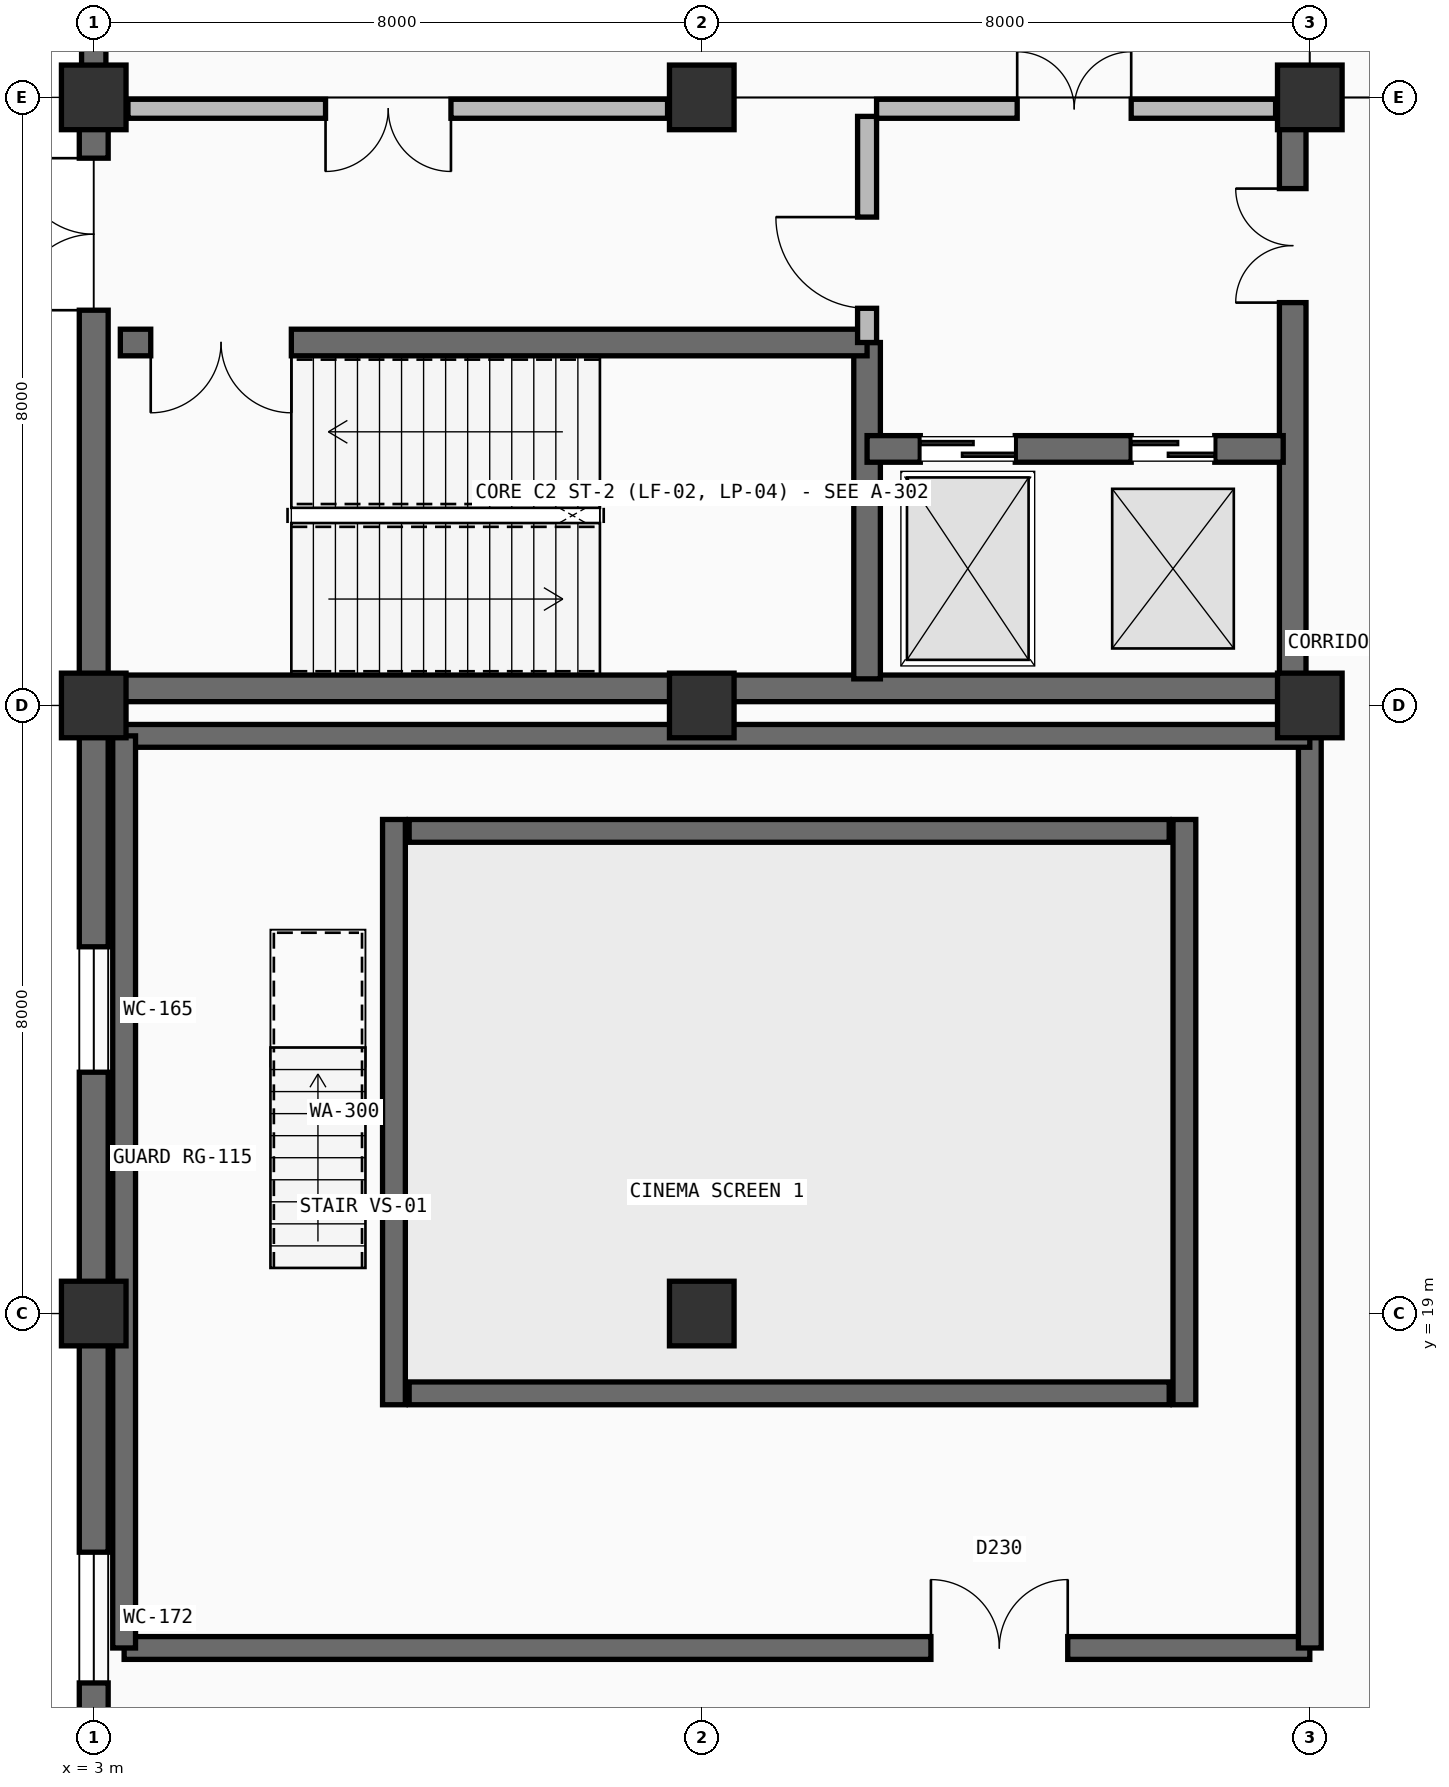
"""IFC4 building model, lengths in metres.
Left out: names, types, materials, properties, quantities, classifications, styles, units other than length and angle.
Written with IfcOpenShell. Run it as: python <this file> out.ifc"""

import sys

from ifc_helpers import new_model, si_unit, direction, frame, frame_2d, origin, origin_2d, place, context, subcontext, project, spatial, polyline, rectangle, outline, extrude, element, fill, save


model = new_model("IFC4")
c1 = context("Model", 3, precision=1e-05, world=origin(), true_north=direction((0.0, 1.0)))
c2 = subcontext(c1, "Body", "Model", "MODEL_VIEW")
j1 = project(units=[si_unit("LENGTHUNIT", "METRE"), si_unit("PLANEANGLEUNIT", "RADIAN")], contexts=[c1])
p1 = place(None, origin())
s1 = spatial("IfcSite", under=j1, at=p1, CompositionType="ELEMENT")
p2 = place(p1, origin())
s2 = spatial("IfcBuilding", under=s1, at=p2, CompositionType="ELEMENT")
p3 = place(p2, origin())
s3 = spatial("IfcBuildingStorey", under=s2, at=p3, CompositionType="ELEMENT", Elevation=0.0)
for number, where, z_axis, x_axis in (
    (1, (3.0, 19.0, 0.0), (0.0, 0.0, 1.0), (1.0, 0.0, 0.0)),
    (2, (3.0, 27.0, 0.0), (0.0, 0.0, 1.0), (1.0, 0.0, 0.0)),
    (3, (3.0, 35.0, 0.0), (0.0, 0.0, 1.0), (1.0, 0.0, 0.0)),
    (4, (11.0, 19.0, 0.0), (0.0, 0.0, 1.0), (1.0, 0.0, 0.0)),
    (5, (11.0, 27.0, 0.0), (0.0, 0.0, 1.0), (1.0, 0.0, 0.0)),
    (6, (11.0, 35.0, 0.0), (0.0, 0.0, 1.0), (1.0, 0.0, 0.0)),
    (7, (19.0, 27.0, 0.0), (0.0, 0.0, 1.0), (1.0, 0.0, 0.0)),
    (8, (19.0, 35.0, 0.0), (0.0, 0.0, 1.0), (1.0, 0.0, 0.0)),
):
    element("IfcColumn", number, at=place(p3, frame(where, z_axis=z_axis, x_axis=x_axis)), inside=s3, PredefinedType="COLUMN", context=c2, shape_type="SweptSolid", body=[
        extrude(rectangle(XDim=0.85, YDim=0.85, at=origin_2d()), origin(), (0.0, 0.0, 1.0), 5.4),
    ])
for number, where, z_axis, x_axis in (
    (9, (6.95, 17.8, 0.0), (0.0, 0.0, 1.0), (0.0, 1.0, 0.0)),
    (10, (17.35, 17.8, 0.0), (0.0, 0.0, 1.0), (0.0, 1.0, 0.0)),
):
    element("IfcWall", number, at=place(p3, frame(where, z_axis=z_axis, x_axis=x_axis)), inside=s3, PredefinedType="SHEAR", context=c2, shape_type="SweptSolid", body=[
        extrude(outline(polyline([(0.0, 0.0), (7.7, 0.0), (7.7, 2.07), (0.0, 0.32), (0.0, 0.0)])), frame((0.0, 0.15, 0.0), z_axis=(0.0, -1.0, 0.0), x_axis=(1.0, 0.0, 0.0)), (0.0, 0.0, 1.0), 0.3),
    ])
p4 = place(p3, frame((7.15, 25.35, 0.0), z_axis=(0.0, 0.0, 1.0), x_axis=(1.0, 0.0, 0.0)))
e11 = element("IfcWall", 11, at=p4, inside=s3, PredefinedType="SHEAR", context=c2, shape_type="SweptSolid", body=[
    extrude(rectangle(XDim=10.0, YDim=0.3, at=frame_2d((5.0, 0.0))), origin(), (0.0, 0.0, 1.0), 2.07),
])
p5 = place(p3, frame((7.15, 17.95, 0.0), z_axis=(0.0, 0.0, 1.0), x_axis=(1.0, 0.0, 0.0)))
e12 = element("IfcWall", 12, at=p5, inside=s3, PredefinedType="SHEAR", context=c2, shape_type="SweptSolid", body=[
    extrude(rectangle(XDim=10.0, YDim=0.3, at=frame_2d((5.0, 0.0))), origin(), (0.0, 0.0, 1.0), 0.32),
])
p6 = place(p3, frame((3.0, 11.0, 0.0), z_axis=(0.0, 0.0, 1.0), x_axis=(0.0, 1.0, 0.0)))
e13 = element("IfcWall", 13, at=p6, inside=s3, PredefinedType="SOLIDWALL", context=c2, shape_type="SweptSolid", body=[
    extrude(rectangle(XDim=8.0, YDim=0.38, at=frame_2d((4.0, 0.0))), origin(), (0.0, 0.0, 1.0), 5.4),
])
p7 = place(p6, frame((3.14, 0.0, 0.85)))
e14 = element("IfcOpeningElement", 14, at=p7, cuts=e13, PredefinedType="OPENING", context=c2, shape_type="SweptSolid", body=[
    extrude(rectangle(XDim=1.72, YDim=3.1, at=frame_2d((0.86, 1.55))), frame((0.0, 0.2, 0.0), z_axis=(0.0, -1.0, 0.0), x_axis=(1.0, 0.0, 0.0)), (0.0, 0.0, 1.0), 0.4),
])
p8 = place(p3, frame((3.0, 19.0, 0.0), z_axis=(0.0, 0.0, 1.0), x_axis=(0.0, 1.0, 0.0)))
e15 = element("IfcWall", 15, at=p8, inside=s3, PredefinedType="SOLIDWALL", context=c2, shape_type="SweptSolid", body=[
    extrude(rectangle(XDim=8.0, YDim=0.38, at=frame_2d((4.0, 0.0))), origin(), (0.0, 0.0, 1.0), 5.4),
])
p9 = place(p8, frame((3.175, 0.0, 0.85)))
e16 = element("IfcOpeningElement", 16, at=p9, cuts=e15, PredefinedType="OPENING", context=c2, shape_type="SweptSolid", body=[
    extrude(rectangle(XDim=1.65, YDim=3.0, at=frame_2d((0.825, 1.5))), frame((0.0, 0.2, 0.0), z_axis=(0.0, -1.0, 0.0), x_axis=(1.0, 0.0, 0.0)), (0.0, 0.0, 1.0), 0.4),
])
p10 = place(p3, frame((3.0, 27.0, 0.0), z_axis=(0.0, 0.0, 1.0), x_axis=(0.0, 1.0, 0.0)))
e17 = element("IfcWall", 17, at=p10, inside=s3, PredefinedType="SOLIDWALL", context=c2, shape_type="SweptSolid", body=[
    extrude(rectangle(XDim=8.0, YDim=0.38, at=frame_2d((4.0, 0.0))), origin(), (0.0, 0.0, 1.0), 5.4),
])
p11 = place(p10, frame((5.2, 0.0, 0.0)))
e18 = element("IfcOpeningElement", 18, at=p11, cuts=e17, PredefinedType="OPENING", context=c2, shape_type="SweptSolid", body=[
    extrude(rectangle(XDim=2.0, YDim=2.6, at=frame_2d((1.0, 1.3))), frame((0.0, 0.2, 0.0), z_axis=(0.0, -1.0, 0.0), x_axis=(1.0, 0.0, 0.0)), (0.0, 0.0, 1.0), 0.4),
])
p12 = place(p3, frame((3.0, 35.0, 0.0), z_axis=(0.0, 0.0, 1.0), x_axis=(0.0, 1.0, 0.0)))
e19 = element("IfcWall", 19, at=p12, inside=s3, PredefinedType="SOLIDWALL", context=c2, shape_type="SweptSolid", body=[
    extrude(rectangle(XDim=8.0, YDim=0.32, at=frame_2d((4.0, 0.0))), origin(), (0.0, 0.0, 1.0), 5.4),
])
p13 = place(p12, frame((3.1, 0.0, 1.1)))
e20 = element("IfcOpeningElement", 20, at=p13, cuts=e19, PredefinedType="OPENING", context=c2, shape_type="SweptSolid", body=[
    extrude(rectangle(XDim=1.8, YDim=0.85, at=frame_2d((0.9, 0.425))), frame((0.0, 0.17, 0.0), z_axis=(0.0, -1.0, 0.0), x_axis=(1.0, 0.0, 0.0)), (0.0, 0.0, 1.0), 0.34),
])
p14 = place(p3, frame((3.2, 27.225, 0.0), z_axis=(0.0, 0.0, 1.0), x_axis=(1.0, 0.0, 0.0)))
e21 = element("IfcWall", 21, at=p14, inside=s3, PredefinedType="SHEAR", context=c2, shape_type="SweptSolid", body=[
    extrude(rectangle(XDim=15.6, YDim=0.35, at=frame_2d((7.8, 0.0))), origin(), (0.0, 0.0, 1.0), 5.1),
])
p15 = place(p3, frame((13.175, 27.35, 0.0), z_axis=(0.0, 0.0, 1.0), x_axis=(0.0, 1.0, 0.0)))
e22 = element("IfcWall", 22, at=p15, inside=s3, PredefinedType="SHEAR", context=c2, shape_type="SweptSolid", body=[
    extrude(rectangle(XDim=4.425, YDim=0.35, at=frame_2d((2.212, 0.0))), origin(), (0.0, 0.0, 1.0), 5.1),
])
p16 = place(p3, frame((18.775, 27.2, 0.0), z_axis=(0.0, 0.0, 1.0), x_axis=(0.0, 1.0, 0.0)))
e23 = element("IfcWall", 23, at=p16, inside=s3, PredefinedType="SHEAR", context=c2, shape_type="SweptSolid", body=[
    extrude(rectangle(XDim=7.6, YDim=0.35, at=frame_2d((3.8, 0.0))), origin(), (0.0, 0.0, 1.0), 5.1),
])
p17 = place(p16, frame((5.1, 0.0, 0.0)))
e24 = element("IfcOpeningElement", 24, at=p17, cuts=e23, PredefinedType="OPENING", context=c2, shape_type="SweptSolid", body=[
    extrude(rectangle(XDim=1.5, YDim=2.2, at=frame_2d((0.75, 1.1))), frame((0.0, 0.185, 0.0), z_axis=(0.0, -1.0, 0.0), x_axis=(1.0, 0.0, 0.0)), (0.0, 0.0, 1.0), 0.37),
])
p18 = place(p3, frame((3.35, 31.775, 0.0), z_axis=(0.0, 0.0, 1.0), x_axis=(1.0, 0.0, 0.0)))
e25 = element("IfcWall", 25, at=p18, inside=s3, PredefinedType="SHEAR", context=c2, shape_type="SweptSolid", body=[
    extrude(rectangle(XDim=9.825, YDim=0.35, at=frame_2d((4.913, 0.0))), origin(), (0.0, 0.0, 1.0), 5.1),
])
p19 = place(p18, frame((0.4, 0.0, 0.0)))
e26 = element("IfcOpeningElement", 26, at=p19, cuts=e25, PredefinedType="OPENING", context=c2, shape_type="SweptSolid", body=[
    extrude(rectangle(XDim=1.85, YDim=2.25, at=frame_2d((0.925, 1.125))), frame((0.0, 0.185, 0.0), z_axis=(0.0, -1.0, 0.0), x_axis=(1.0, 0.0, 0.0)), (0.0, 0.0, 1.0), 0.37),
])
p20 = place(p3, frame((13.175, 30.375, 0.0), z_axis=(0.0, 0.0, 1.0), x_axis=(1.0, 0.0, 0.0)))
e27 = element("IfcWall", 27, at=p20, inside=s3, PredefinedType="SHEAR", context=c2, shape_type="SweptSolid", body=[
    extrude(rectangle(XDim=5.475, YDim=0.35, at=frame_2d((2.737, 0.0))), origin(), (0.0, 0.0, 1.0), 5.1),
])
p21 = place(p20, frame((0.7, 0.0, 0.0)))
e28 = element("IfcOpeningElement", 28, at=p21, cuts=e27, PredefinedType="OPENING", context=c2, shape_type="SweptSolid", body=[
    extrude(rectangle(XDim=1.25, YDim=2.25, at=frame_2d((0.625, 1.125))), frame((0.0, 0.185, 0.0), z_axis=(0.0, -1.0, 0.0), x_axis=(1.0, 0.0, 0.0)), (0.0, 0.0, 1.0), 0.37),
])
p22 = place(p20, frame((3.475, 0.0, 0.0)))
e29 = element("IfcOpeningElement", 29, at=p22, cuts=e27, PredefinedType="OPENING", context=c2, shape_type="SweptSolid", body=[
    extrude(rectangle(XDim=1.1, YDim=2.2, at=frame_2d((0.55, 1.1))), frame((0.0, 0.185, 0.0), z_axis=(0.0, -1.0, 0.0), x_axis=(1.0, 0.0, 0.0)), (0.0, 0.0, 1.0), 0.37),
])
p23 = place(p3, frame((13.175, 31.775, 0.0), z_axis=(0.0, 0.0, 1.0), x_axis=(0.0, 1.0, 0.0)))
e30 = element("IfcWall", 30, at=p23, inside=s3, PredefinedType="PARTITIONING", context=c2, shape_type="SweptSolid", body=[
    extrude(rectangle(XDim=2.975, YDim=0.25, at=frame_2d((1.488, 0.0))), origin(), (0.0, 0.0, 1.0), 5.1),
])
p24 = place(p23, frame((0.45, 0.0, 0.0)))
e31 = element("IfcOpeningElement", 31, at=p24, cuts=e30, PredefinedType="OPENING", context=c2, shape_type="SweptSolid", body=[
    extrude(rectangle(XDim=1.2, YDim=2.2, at=frame_2d((0.6, 1.1))), frame((0.0, 0.135, 0.0), z_axis=(0.0, -1.0, 0.0), x_axis=(1.0, 0.0, 0.0)), (0.0, 0.0, 1.0), 0.27),
])
p25 = place(p3, frame((3.45, 34.85, 0.0), z_axis=(0.0, 0.0, 1.0), x_axis=(1.0, 0.0, 0.0)))
e32 = element("IfcWall", 32, at=p25, inside=s3, PredefinedType="PARTITIONING", context=c2, shape_type="SweptSolid", body=[
    extrude(rectangle(XDim=7.1, YDim=0.25, at=frame_2d((3.55, 0.0))), origin(), (0.0, 0.0, 1.0), 4.335),
])
p26 = place(p25, frame((2.6, 0.0, 0.0)))
e33 = element("IfcOpeningElement", 33, at=p26, cuts=e32, PredefinedType="OPENING", context=c2, shape_type="SweptSolid", body=[
    extrude(rectangle(XDim=1.65, YDim=2.25, at=frame_2d((0.825, 1.125))), frame((0.0, 0.135, 0.0), z_axis=(0.0, -1.0, 0.0), x_axis=(1.0, 0.0, 0.0)), (0.0, 0.0, 1.0), 0.27),
])
p27 = place(p3, frame((13.3, 34.85, 0.0), z_axis=(0.0, 0.0, 1.0), x_axis=(1.0, 0.0, 0.0)))
e34 = element("IfcWall", 34, at=p27, inside=s3, PredefinedType="PARTITIONING", context=c2, shape_type="SweptSolid", body=[
    extrude(rectangle(XDim=5.25, YDim=0.25, at=frame_2d((2.625, 0.0))), origin(), (0.0, 0.0, 1.0), 4.335),
])
p28 = place(p27, frame((1.85, 0.0, 0.0)))
e35 = element("IfcOpeningElement", 35, at=p28, cuts=e34, PredefinedType="OPENING", context=c2, shape_type="SweptSolid", body=[
    extrude(rectangle(XDim=1.5, YDim=2.2, at=frame_2d((0.75, 1.1))), frame((0.0, 0.135, 0.0), z_axis=(0.0, -1.0, 0.0), x_axis=(1.0, 0.0, 0.0)), (0.0, 0.0, 1.0), 0.27),
])
p29 = place(p3, frame((3.4, 14.6, 0.0), z_axis=(0.0, 0.0, 1.0), x_axis=(1.0, 0.0, 0.0)))
e36 = element("IfcWall", 36, at=p29, inside=s3, PredefinedType="SHEAR", context=c2, shape_type="SweptSolid", body=[
    extrude(rectangle(XDim=15.6, YDim=0.3, at=frame_2d((7.8, 0.0))), origin(), (0.0, 0.0, 1.0), 5.1),
])
p30 = place(p29, frame((10.615, 0.0, 0.0)))
e37 = element("IfcOpeningElement", 37, at=p30, cuts=e36, PredefinedType="OPENING", context=c2, shape_type="SweptSolid", body=[
    extrude(rectangle(XDim=1.8, YDim=2.3, at=frame_2d((0.9, 1.15))), frame((0.0, 0.16, 0.0), z_axis=(0.0, -1.0, 0.0), x_axis=(1.0, 0.0, 0.0)), (0.0, 0.0, 1.0), 0.32),
])
p31 = place(p3, frame((19.0, 14.6, 0.0), z_axis=(0.0, 0.0, 1.0), x_axis=(0.0, 1.0, 0.0)))
e38 = element("IfcWall", 38, at=p31, inside=s3, PredefinedType="SHEAR", context=c2, shape_type="SweptSolid", body=[
    extrude(rectangle(XDim=12.0, YDim=0.3, at=frame_2d((6.0, 0.0))), origin(), (0.0, 0.0, 1.0), 5.1),
])
p32 = place(p3, frame((3.4, 26.6, 0.0), z_axis=(0.0, 0.0, 1.0), x_axis=(1.0, 0.0, 0.0)))
e39 = element("IfcWall", 39, at=p32, inside=s3, PredefinedType="SHEAR", context=c2, shape_type="SweptSolid", body=[
    extrude(rectangle(XDim=15.6, YDim=0.3, at=frame_2d((7.8, 0.0))), origin(), (0.0, 0.0, 1.0), 5.1),
])
p33 = place(p3, frame((3.4, 14.6, 0.0), z_axis=(0.0, 0.0, 1.0), x_axis=(0.0, 1.0, 0.0)))
e40 = element("IfcWall", 40, at=p33, inside=s3, PredefinedType="SHEAR", context=c2, shape_type="SweptSolid", body=[
    extrude(rectangle(XDim=12.0, YDim=0.3, at=frame_2d((6.0, 0.0))), origin(), (0.0, 0.0, 1.0), 5.1),
])
p34 = place(p7, origin())
e41 = element("IfcWindow", 41, at=p34, inside=s3, PartitioningType="SINGLE_PANEL", PredefinedType="WINDOW", context=c2, shape_type="SweptSolid", body=[
    extrude(rectangle(XDim=1.72, YDim=3.1, at=frame_2d((0.86, 1.55))), frame((0.0, 0.03, 0.0), z_axis=(0.0, -1.0, 0.0), x_axis=(1.0, 0.0, 0.0)), (0.0, 0.0, 1.0), 0.06),
])
fill(e14, e41)
p35 = place(p9, origin())
e42 = element("IfcWindow", 42, at=p35, inside=s3, PartitioningType="SINGLE_PANEL", PredefinedType="WINDOW", context=c2, shape_type="SweptSolid", body=[
    extrude(rectangle(XDim=1.65, YDim=3.0, at=frame_2d((0.825, 1.5))), frame((0.0, 0.03, 0.0), z_axis=(0.0, -1.0, 0.0), x_axis=(1.0, 0.0, 0.0)), (0.0, 0.0, 1.0), 0.06),
])
fill(e16, e42)
p36 = place(p11, origin())
e43 = element("IfcDoor", 43, at=p36, inside=s3, OperationType="DOUBLE_DOOR_SINGLE_SWING", PredefinedType="DOOR", context=c2, shape_type="SweptSolid", body=[
    extrude(rectangle(XDim=2.0, YDim=2.6, at=frame_2d((1.0, 1.3))), frame((0.0, 0.025, 0.0), z_axis=(0.0, -1.0, 0.0), x_axis=(1.0, 0.0, 0.0)), (0.0, 0.0, 1.0), 0.05),
])
fill(e18, e43)
p37 = place(p19, frame((1.85, 0.0, 0.0), z_axis=(0.0, 0.0, 1.0), x_axis=(-1.0, 0.0, 0.0)))
e44 = element("IfcDoor", 44, at=p37, inside=s3, OperationType="DOUBLE_DOOR_SINGLE_SWING", PredefinedType="DOOR", context=c2, shape_type="SweptSolid", body=[
    extrude(rectangle(XDim=1.85, YDim=2.25, at=frame_2d((0.925, 1.125))), frame((0.0, 0.025, 0.0), z_axis=(0.0, -1.0, 0.0), x_axis=(1.0, 0.0, 0.0)), (0.0, 0.0, 1.0), 0.05),
])
fill(e26, e44)
p38 = place(p21, origin())
e45 = element("IfcDoor", 45, at=p38, inside=s3, OperationType="DOUBLE_DOOR_SLIDING", PredefinedType="DOOR", context=c2, shape_type="SweptSolid", body=[
    extrude(rectangle(XDim=1.25, YDim=2.25, at=frame_2d((0.625, 1.125))), frame((0.0, 0.025, 0.0), z_axis=(0.0, -1.0, 0.0), x_axis=(1.0, 0.0, 0.0)), (0.0, 0.0, 1.0), 0.05),
])
fill(e28, e45)
p39 = place(p22, origin())
e46 = element("IfcDoor", 46, at=p39, inside=s3, OperationType="DOUBLE_DOOR_SLIDING", PredefinedType="DOOR", context=c2, shape_type="SweptSolid", body=[
    extrude(rectangle(XDim=1.1, YDim=2.2, at=frame_2d((0.55, 1.1))), frame((0.0, 0.025, 0.0), z_axis=(0.0, -1.0, 0.0), x_axis=(1.0, 0.0, 0.0)), (0.0, 0.0, 1.0), 0.05),
])
fill(e29, e46)
p40 = place(p24, origin())
e47 = element("IfcDoor", 47, at=p40, inside=s3, OperationType="SINGLE_SWING_RIGHT", PredefinedType="DOOR", context=c2, shape_type="SweptSolid", body=[
    extrude(rectangle(XDim=1.2, YDim=2.2, at=frame_2d((0.6, 1.1))), frame((0.0, 0.025, 0.0), z_axis=(0.0, -1.0, 0.0), x_axis=(1.0, 0.0, 0.0)), (0.0, 0.0, 1.0), 0.05),
])
fill(e31, e47)
p41 = place(p26, frame((1.65, 0.0, 0.0), z_axis=(0.0, 0.0, 1.0), x_axis=(-1.0, 0.0, 0.0)))
e48 = element("IfcDoor", 48, at=p41, inside=s3, OperationType="DOUBLE_DOOR_SINGLE_SWING", PredefinedType="DOOR", context=c2, shape_type="SweptSolid", body=[
    extrude(rectangle(XDim=1.65, YDim=2.25, at=frame_2d((0.825, 1.125))), frame((0.0, 0.025, 0.0), z_axis=(0.0, -1.0, 0.0), x_axis=(1.0, 0.0, 0.0)), (0.0, 0.0, 1.0), 0.05),
])
fill(e33, e48)
p42 = place(p28, origin())
e49 = element("IfcDoor", 49, at=p42, inside=s3, OperationType="DOUBLE_DOOR_SINGLE_SWING", PredefinedType="DOOR", context=c2, shape_type="SweptSolid", body=[
    extrude(rectangle(XDim=1.5, YDim=2.2, at=frame_2d((0.75, 1.1))), frame((0.0, 0.025, 0.0), z_axis=(0.0, -1.0, 0.0), x_axis=(1.0, 0.0, 0.0)), (0.0, 0.0, 1.0), 0.05),
])
fill(e35, e49)
p43 = place(p17, origin())
e50 = element("IfcDoor", 50, at=p43, inside=s3, OperationType="DOUBLE_DOOR_SINGLE_SWING", PredefinedType="DOOR", context=c2, shape_type="SweptSolid", body=[
    extrude(rectangle(XDim=1.5, YDim=2.2, at=frame_2d((0.75, 1.1))), frame((0.0, 0.025, 0.0), z_axis=(0.0, -1.0, 0.0), x_axis=(1.0, 0.0, 0.0)), (0.0, 0.0, 1.0), 0.05),
])
fill(e24, e50)
p44 = place(p30, origin())
e51 = element("IfcDoor", 51, at=p44, inside=s3, OperationType="DOUBLE_DOOR_SINGLE_SWING", PredefinedType="DOOR", context=c2, shape_type="SweptSolid", body=[
    extrude(rectangle(XDim=1.8, YDim=2.3, at=frame_2d((0.9, 1.15))), frame((0.0, 0.025, 0.0), z_axis=(0.0, -1.0, 0.0), x_axis=(1.0, 0.0, 0.0)), (0.0, 0.0, 1.0), 0.05),
])
fill(e37, e51)
save(model, sys.argv[1])
